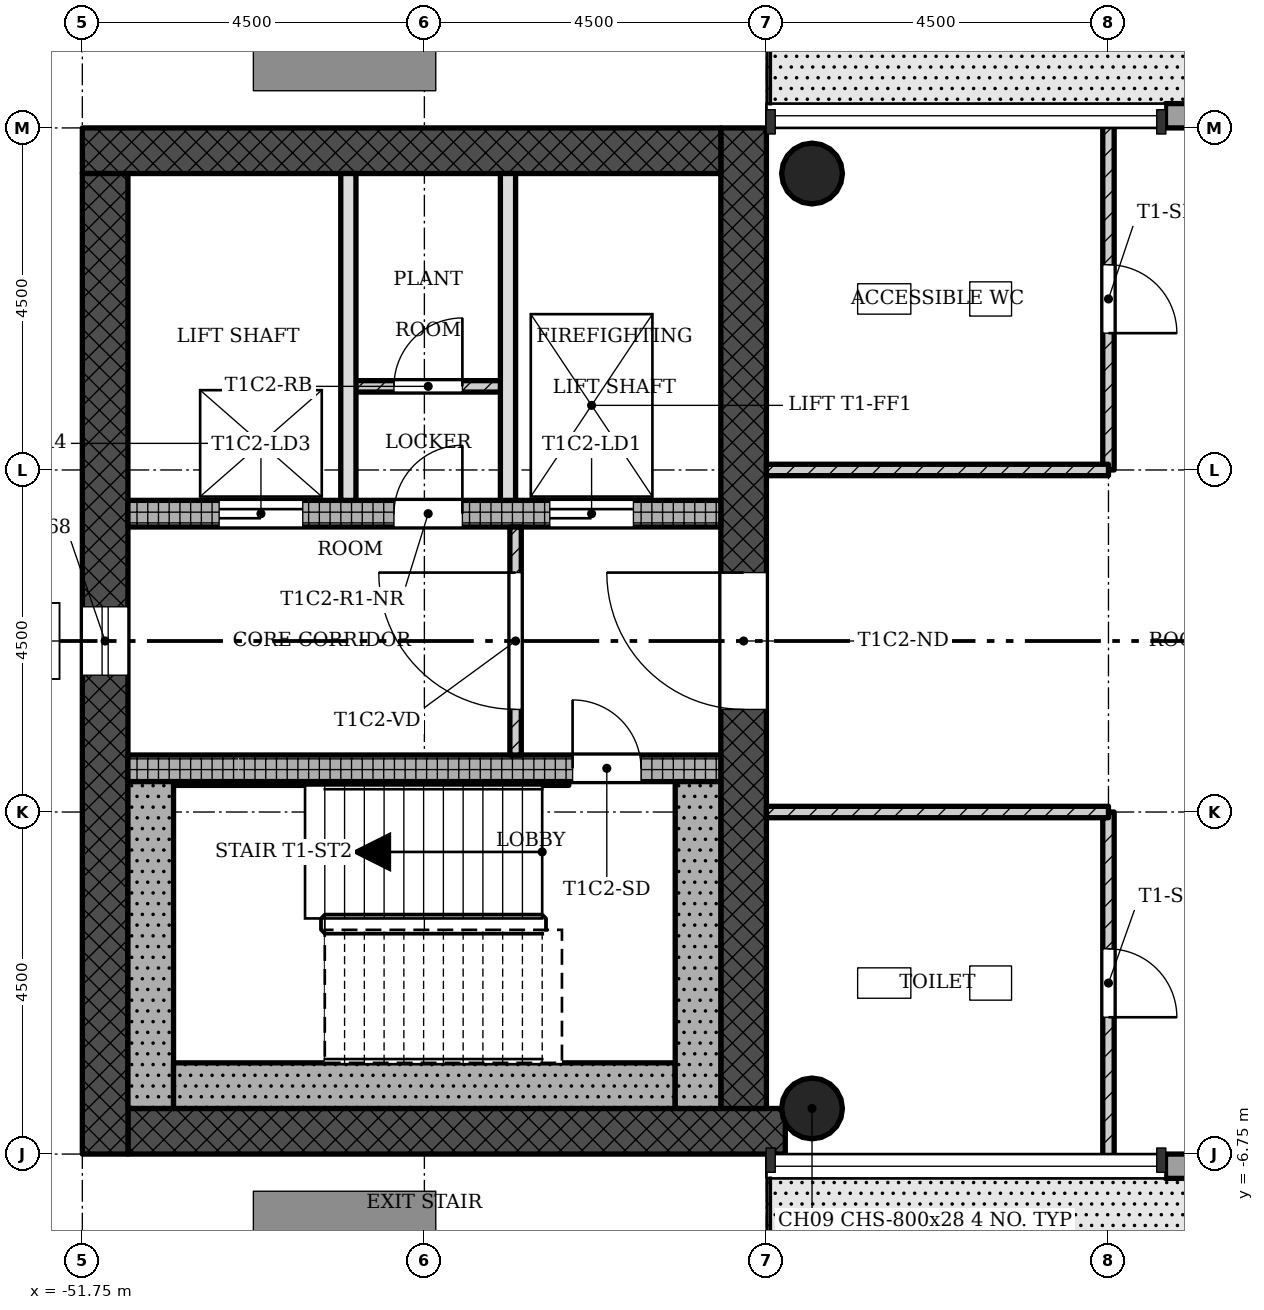
"""IFC4 building model, lengths in metres.
Left out: names, types, materials, properties, quantities, classifications, styles, units other than length and angle.
Written with IfcOpenShell. Run it as: python <this file> out.ifc"""

import sys

from ifc_helpers import new_model, si_unit, direction, frame, frame_2d, origin, origin_2d, place, context, subcontext, project, spatial, rectangle, hollow_circle, extrude, element, fill, save


model = new_model("IFC4")
c1 = context("Model", 3, precision=1e-05, world=origin(), true_north=direction((0.0, 1.0)))
c2 = subcontext(c1, "Body", "Model", "MODEL_VIEW")
j1 = project(units=[si_unit("LENGTHUNIT", "METRE"), si_unit("PLANEANGLEUNIT", "RADIAN")], contexts=[c1])
p1 = place(None, origin())
s1 = spatial("IfcSite", under=j1, at=p1, CompositionType="ELEMENT")
p2 = place(p1, origin())
s2 = spatial("IfcBuilding", under=s1, at=p2, CompositionType="ELEMENT")
p3 = place(p2, frame((0.0, 0.0, 246.9)))
s3 = spatial("IfcBuildingStorey", under=s2, at=p3, CompositionType="ELEMENT", Elevation=246.9)
p4 = place(p3, frame((-51.15, -6.45, 0.0), z_axis=(0.0, 0.0, 1.0), x_axis=(1.0, 0.0, 0.0)))
e1 = element("IfcWall", 1, at=p4, inside=s3, PredefinedType="SHEAR", context=c2, shape_type="SweptSolid", body=[
    extrude(rectangle(XDim=8.648, YDim=0.6, at=frame_2d((4.324, 0.0))), origin(), (0.0, 0.0, 1.0), 4.5),
])
p5 = place(p3, frame((-43.05, -6.15, 0.0), z_axis=(0.0, 0.0, 1.0), x_axis=(0.0, 1.0, 0.0)))
e2 = element("IfcWall", 2, at=p5, inside=s3, PredefinedType="SHEAR", context=c2, shape_type="SweptSolid", body=[
    extrude(rectangle(XDim=12.9, YDim=0.6, at=frame_2d((6.45, 0.0))), origin(), (0.0, 0.0, 1.0), 4.5),
])
p6 = place(p5, frame((5.25, 0.0, 0.0)))
e3 = element("IfcOpeningElement", 3, at=p6, cuts=e2, PredefinedType="OPENING", context=c2, shape_type="SweptSolid", body=[
    extrude(rectangle(XDim=1.8, YDim=2.1, at=frame_2d((0.9, 1.05))), frame((0.0, 0.31, 0.0), z_axis=(0.0, -1.0, 0.0), x_axis=(1.0, 0.0, 0.0)), (0.0, 0.0, 1.0), 0.62),
])
p7 = place(p3, frame((-43.35, 6.45, 0.0), z_axis=(0.0, 0.0, 1.0), x_axis=(-1.0, 0.0, 0.0)))
e4 = element("IfcWall", 4, at=p7, inside=s3, PredefinedType="SHEAR", context=c2, shape_type="SweptSolid", body=[
    extrude(rectangle(XDim=8.4, YDim=0.6, at=frame_2d((4.2, 0.0))), origin(), (0.0, 0.0, 1.0), 4.5),
])
p8 = place(p3, frame((-51.45, 6.15, 0.0), z_axis=(0.0, 0.0, 1.0), x_axis=(0.0, -1.0, 0.0)))
e5 = element("IfcWall", 5, at=p8, inside=s3, PredefinedType="SHEAR", context=c2, shape_type="SweptSolid", body=[
    extrude(rectangle(XDim=12.9, YDim=0.6, at=frame_2d((6.45, 0.0))), origin(), (0.0, 0.0, 1.0), 4.5),
])
p9 = place(p8, frame((5.7, 0.0, 0.45)))
e6 = element("IfcOpeningElement", 6, at=p9, cuts=e5, PredefinedType="OPENING", context=c2, shape_type="SweptSolid", body=[
    extrude(rectangle(XDim=0.9, YDim=2.4, at=frame_2d((0.45, 1.2))), frame((0.0, 0.31, 0.0), z_axis=(0.0, -1.0, 0.0), x_axis=(1.0, 0.0, 0.0)), (0.0, 0.0, 1.0), 0.62),
])
p10 = place(p3, frame((-51.15, -1.675, 0.0), z_axis=(0.0, 0.0, 1.0), x_axis=(1.0, 0.0, 0.0)))
e7 = element("IfcWall", 7, at=p10, inside=s3, PredefinedType="SHEAR", context=c2, shape_type="SweptSolid", body=[
    extrude(rectangle(XDim=7.8, YDim=0.35, at=frame_2d((3.9, 0.0))), origin(), (0.0, 0.0, 1.0), 4.5),
])
p11 = place(p10, frame((5.85, 0.0, 0.0)))
e8 = element("IfcOpeningElement", 8, at=p11, cuts=e7, PredefinedType="OPENING", context=c2, shape_type="SweptSolid", body=[
    extrude(rectangle(XDim=0.9, YDim=2.1, at=frame_2d((0.45, 1.05))), frame((0.0, 0.185, 0.0), z_axis=(0.0, -1.0, 0.0), x_axis=(1.0, 0.0, 0.0)), (0.0, 0.0, 1.0), 0.37),
])
p12 = place(p3, frame((-51.15, 1.675, 0.0), z_axis=(0.0, 0.0, 1.0), x_axis=(1.0, 0.0, 0.0)))
e9 = element("IfcWall", 9, at=p12, inside=s3, PredefinedType="SHEAR", context=c2, shape_type="SweptSolid", body=[
    extrude(rectangle(XDim=7.8, YDim=0.35, at=frame_2d((3.9, 0.0))), origin(), (0.0, 0.0, 1.0), 4.5),
])
p13 = place(p12, frame((5.55, 0.0, 0.0)))
e10 = element("IfcOpeningElement", 10, at=p13, cuts=e9, PredefinedType="OPENING", context=c2, shape_type="SweptSolid", body=[
    extrude(rectangle(XDim=1.1, YDim=2.1, at=frame_2d((0.55, 1.05))), frame((0.0, 0.185, 0.0), z_axis=(0.0, -1.0, 0.0), x_axis=(1.0, 0.0, 0.0)), (0.0, 0.0, 1.0), 0.37),
])
p14 = place(p12, frame((1.2, 0.0, 0.0)))
e11 = element("IfcOpeningElement", 11, at=p14, cuts=e9, PredefinedType="OPENING", context=c2, shape_type="SweptSolid", body=[
    extrude(rectangle(XDim=1.1, YDim=2.1, at=frame_2d((0.55, 1.05))), frame((0.0, 0.185, 0.0), z_axis=(0.0, -1.0, 0.0), x_axis=(1.0, 0.0, 0.0)), (0.0, 0.0, 1.0), 0.37),
])
p15 = place(p12, frame((3.5, 0.0, 0.0)))
e12 = element("IfcOpeningElement", 12, at=p15, cuts=e9, PredefinedType="OPENING", context=c2, shape_type="SweptSolid", body=[
    extrude(rectangle(XDim=0.9, YDim=2.1, at=frame_2d((0.45, 1.05))), frame((0.0, 0.185, 0.0), z_axis=(0.0, -1.0, 0.0), x_axis=(1.0, 0.0, 0.0)), (0.0, 0.0, 1.0), 0.37),
])
for number, where, z_axis, x_axis in (
    (13, (-42.15, -6.15, 0.0), (0.0, 0.0, 1.0), (1.0, 0.0, 0.0)),
    (14, (-42.15, 6.15, 0.0), (0.0, 0.0, 1.0), (1.0, 0.0, 0.0)),
):
    element("IfcColumn", number, at=place(p3, frame(where, z_axis=z_axis, x_axis=x_axis)), inside=s3, PredefinedType="COLUMN", context=c2, shape_type="SweptSolid", body=[
        extrude(hollow_circle(Radius=0.4, WallThickness=0.028, at=origin_2d()), origin(), (0.0, 0.0, 1.0), 4.5),
    ])
p16 = place(p3, frame((-37.5, -6.91, -0.02), z_axis=(0.0, 0.0, 1.0), x_axis=(1.0, 0.0, 0.0)))
e15 = element("IfcWall", 15, at=p16, inside=s3, PredefinedType="STANDARD", context=c2, shape_type="SweptSolid", body=[
    extrude(rectangle(XDim=3.0, YDim=0.32, at=frame_2d((1.5, 0.0))), origin(), (0.0, 0.0, 1.0), 4.22),
])
p17 = place(p16, frame((1.0, 0.0, 0.02)))
e16 = element("IfcOpeningElement", 16, at=p17, cuts=e15, PredefinedType="OPENING", context=c2, shape_type="SweptSolid", body=[
    extrude(rectangle(XDim=1.0, YDim=2.1, at=frame_2d((0.5, 1.05))), frame((0.0, 0.17, 0.0), z_axis=(0.0, -1.0, 0.0), x_axis=(1.0, 0.0, 0.0)), (0.0, 0.0, 1.0), 0.34),
])
p18 = place(p3, frame((-34.5, 6.91, -0.02), z_axis=(0.0, 0.0, 1.0), x_axis=(-1.0, 0.0, 0.0)))
e17 = element("IfcWall", 17, at=p18, inside=s3, PredefinedType="STANDARD", context=c2, shape_type="SweptSolid", body=[
    extrude(rectangle(XDim=3.0, YDim=0.32, at=frame_2d((1.5, 0.0))), origin(), (0.0, 0.0, 1.0), 4.22),
])
p19 = place(p18, frame((1.0, 0.0, 0.02)))
e18 = element("IfcOpeningElement", 18, at=p19, cuts=e17, PredefinedType="OPENING", context=c2, shape_type="SweptSolid", body=[
    extrude(rectangle(XDim=1.0, YDim=2.1, at=frame_2d((0.5, 1.05))), frame((0.0, 0.17, 0.0), z_axis=(0.0, -1.0, 0.0), x_axis=(1.0, 0.0, 0.0)), (0.0, 0.0, 1.0), 0.34),
])
p20 = place(p3, frame((-46.05, 1.5, 0.0), z_axis=(0.0, 0.0, 1.0), x_axis=(0.0, -1.0, 0.0)))
e19 = element("IfcWall", 19, at=p20, inside=s3, PredefinedType="PARTITIONING", context=c2, shape_type="SweptSolid", body=[
    extrude(rectangle(XDim=3.0, YDim=0.15, at=frame_2d((1.5, 0.0))), origin(), (0.0, 0.0, 1.0), 4.1),
])
p21 = place(p20, frame((0.6, 0.0, 0.0)))
e20 = element("IfcOpeningElement", 20, at=p21, cuts=e19, PredefinedType="OPENING", context=c2, shape_type="SweptSolid", body=[
    extrude(rectangle(XDim=1.8, YDim=2.1, at=frame_2d((0.9, 1.05))), frame((0.0, 0.085, 0.0), z_axis=(0.0, -1.0, 0.0), x_axis=(1.0, 0.0, 0.0)), (0.0, 0.0, 1.0), 0.17),
])
for number, where, z_axis, x_axis in (
    (21, (-48.25, 6.15, 0.0), (0.0, 0.0, 1.0), (0.0, -1.0, 0.0)),
    (22, (-46.15, 6.15, 0.0), (0.0, 0.0, 1.0), (0.0, -1.0, 0.0)),
):
    element("IfcWall", number, at=place(p3, frame(where, z_axis=z_axis, x_axis=x_axis)), inside=s3, PredefinedType="SOLIDWALL", context=c2, shape_type="SweptSolid", body=[
        extrude(rectangle(XDim=4.3, YDim=0.2, at=frame_2d((2.15, 0.0))), origin(), (0.0, 0.0, 1.0), 4.1),
    ])
p22 = place(p3, frame((-46.15, 3.35, 0.0), z_axis=(0.0, 0.0, 1.0), x_axis=(-1.0, 0.0, 0.0)))
e23 = element("IfcWall", 23, at=p22, inside=s3, PredefinedType="PARTITIONING", context=c2, shape_type="SweptSolid", body=[
    extrude(rectangle(XDim=2.1, YDim=0.15, at=frame_2d((1.05, 0.0))), origin(), (0.0, 0.0, 1.0), 4.1),
])
p23 = place(p22, frame((0.6, 0.0, 0.0)))
e24 = element("IfcOpeningElement", 24, at=p23, cuts=e23, PredefinedType="OPENING", context=c2, shape_type="SweptSolid", body=[
    extrude(rectangle(XDim=0.9, YDim=2.1, at=frame_2d((0.45, 1.05))), frame((0.0, 0.085, 0.0), z_axis=(0.0, -1.0, 0.0), x_axis=(1.0, 0.0, 0.0)), (0.0, 0.0, 1.0), 0.17),
])
p24 = place(p3, frame((-38.25, 2.25, 0.0), z_axis=(0.0, 0.0, 1.0), x_axis=(0.0, 1.0, 0.0)))
e25 = element("IfcWall", 25, at=p24, inside=s3, PredefinedType="PARTITIONING", context=c2, shape_type="SweptSolid", body=[
    extrude(rectangle(XDim=4.6, YDim=0.15, at=frame_2d((2.3, 0.0))), origin(), (0.0, 0.0, 1.0), 4.1),
])
p25 = place(p24, frame((1.8, 0.0, 0.0)))
e26 = element("IfcOpeningElement", 26, at=p25, cuts=e25, PredefinedType="OPENING", context=c2, shape_type="SweptSolid", body=[
    extrude(rectangle(XDim=0.9, YDim=2.1, at=frame_2d((0.45, 1.05))), frame((0.0, 0.085, 0.0), z_axis=(0.0, -1.0, 0.0), x_axis=(1.0, 0.0, 0.0)), (0.0, 0.0, 1.0), 0.17),
])
p26 = place(p3, frame((-42.75, 2.25, 0.0), z_axis=(0.0, 0.0, 1.0), x_axis=(1.0, 0.0, 0.0)))
e27 = element("IfcWall", 27, at=p26, inside=s3, PredefinedType="PARTITIONING", context=c2, shape_type="SweptSolid", body=[
    extrude(rectangle(XDim=4.5, YDim=0.15, at=frame_2d((2.25, 0.0))), origin(), (0.0, 0.0, 1.0), 4.1),
])
p27 = place(p3, frame((-38.25, -6.85, 0.0), z_axis=(0.0, 0.0, 1.0), x_axis=(0.0, 1.0, 0.0)))
e28 = element("IfcWall", 28, at=p27, inside=s3, PredefinedType="PARTITIONING", context=c2, shape_type="SweptSolid", body=[
    extrude(rectangle(XDim=4.6, YDim=0.15, at=frame_2d((2.3, 0.0))), origin(), (0.0, 0.0, 1.0), 4.1),
])
p28 = place(p27, frame((1.9, 0.0, 0.0)))
e29 = element("IfcOpeningElement", 29, at=p28, cuts=e28, PredefinedType="OPENING", context=c2, shape_type="SweptSolid", body=[
    extrude(rectangle(XDim=0.9, YDim=2.1, at=frame_2d((0.45, 1.05))), frame((0.0, 0.085, 0.0), z_axis=(0.0, -1.0, 0.0), x_axis=(1.0, 0.0, 0.0)), (0.0, 0.0, 1.0), 0.17),
])
p29 = place(p3, frame((-42.75, -2.25, 0.0), z_axis=(0.0, 0.0, 1.0), x_axis=(1.0, 0.0, 0.0)))
e30 = element("IfcWall", 30, at=p29, inside=s3, PredefinedType="PARTITIONING", context=c2, shape_type="SweptSolid", body=[
    extrude(rectangle(XDim=4.5, YDim=0.15, at=frame_2d((2.25, 0.0))), origin(), (0.0, 0.0, 1.0), 4.1),
])
p30 = place(p3, frame((-50.85, -1.85, 0.0), z_axis=(0.0, 0.0, 1.0), x_axis=(0.0, -1.0, 0.0)))
e31 = element("IfcWall", 31, at=p30, inside=s3, PredefinedType="SHEAR", context=c2, shape_type="SweptSolid", body=[
    extrude(rectangle(XDim=4.3, YDim=0.6, at=frame_2d((2.15, 0.0))), origin(), (0.0, 0.0, 1.0), 4.5),
])
p31 = place(p3, frame((-43.95, -5.85, 0.0), z_axis=(0.0, 0.0, 1.0), x_axis=(-1.0, 0.0, 0.0)))
e32 = element("IfcWall", 32, at=p31, inside=s3, PredefinedType="SHEAR", context=c2, shape_type="SweptSolid", body=[
    extrude(rectangle(XDim=6.6, YDim=0.6, at=frame_2d((3.3, 0.0))), origin(), (0.0, 0.0, 1.0), 4.5),
])
p32 = place(p3, frame((-43.65, -1.85, 0.0), z_axis=(0.0, 0.0, 1.0), x_axis=(0.0, -1.0, 0.0)))
e33 = element("IfcWall", 33, at=p32, inside=s3, PredefinedType="SHEAR", context=c2, shape_type="SweptSolid", body=[
    extrude(rectangle(XDim=4.3, YDim=0.6, at=frame_2d((2.15, 0.0))), origin(), (0.0, 0.0, 1.0), 4.5),
])
p33 = place(p3, frame((-45.35, -1.875, 0.0), z_axis=(0.0, 0.0, 1.0), x_axis=(-1.0, 0.0, 0.0)))
e34 = element("IfcWall", 34, at=p33, inside=s3, PredefinedType="SHEAR", context=c2, shape_type="SweptSolid", body=[
    extrude(rectangle(XDim=5.2, YDim=0.05, at=frame_2d((2.6, 0.0))), origin(), (0.0, 0.0, 1.0), 4.5),
])
p34 = place(p9, origin())
e35 = element("IfcWindow", 35, at=p34, inside=s3, PartitioningType="SINGLE_PANEL", PredefinedType="WINDOW", context=c2, shape_type="SweptSolid", body=[
    extrude(rectangle(XDim=0.9, YDim=2.4, at=frame_2d((0.45, 1.2))), frame((0.0, 0.03, 0.0), z_axis=(0.0, -1.0, 0.0), x_axis=(1.0, 0.0, 0.0)), (0.0, 0.0, 1.0), 0.06),
])
fill(e6, e35)
p35 = place(p21, origin())
e36 = element("IfcDoor", 36, at=p35, inside=s3, OperationType="SINGLE_SWING_LEFT", PredefinedType="DOOR", context=c2, shape_type="SweptSolid", body=[
    extrude(rectangle(XDim=1.8, YDim=2.1, at=frame_2d((0.9, 1.05))), frame((0.0, 0.025, 0.0), z_axis=(0.0, -1.0, 0.0), x_axis=(1.0, 0.0, 0.0)), (0.0, 0.0, 1.0), 0.05),
])
fill(e20, e36)
p36 = place(p23, origin())
e37 = element("IfcDoor", 37, at=p36, inside=s3, OperationType="SINGLE_SWING_LEFT", PredefinedType="DOOR", context=c2, shape_type="SweptSolid", body=[
    extrude(rectangle(XDim=0.9, YDim=2.1, at=frame_2d((0.45, 1.05))), frame((0.0, 0.025, 0.0), z_axis=(0.0, -1.0, 0.0), x_axis=(1.0, 0.0, 0.0)), (0.0, 0.0, 1.0), 0.05),
])
fill(e24, e37)
p37 = place(p25, origin())
e38 = element("IfcDoor", 38, at=p37, inside=s3, OperationType="SINGLE_SWING_LEFT", PredefinedType="DOOR", context=c2, shape_type="SweptSolid", body=[
    extrude(rectangle(XDim=0.9, YDim=2.1, at=frame_2d((0.45, 1.05))), frame((0.0, 0.025, 0.0), z_axis=(0.0, -1.0, 0.0), x_axis=(1.0, 0.0, 0.0)), (0.0, 0.0, 1.0), 0.05),
])
fill(e26, e38)
p38 = place(p28, origin())
e39 = element("IfcDoor", 39, at=p38, inside=s3, OperationType="SINGLE_SWING_LEFT", PredefinedType="DOOR", context=c2, shape_type="SweptSolid", body=[
    extrude(rectangle(XDim=0.9, YDim=2.1, at=frame_2d((0.45, 1.05))), frame((0.0, 0.025, 0.0), z_axis=(0.0, -1.0, 0.0), x_axis=(1.0, 0.0, 0.0)), (0.0, 0.0, 1.0), 0.05),
])
fill(e29, e39)
p39 = place(p11, origin())
e40 = element("IfcDoor", 40, at=p39, inside=s3, OperationType="SINGLE_SWING_RIGHT", PredefinedType="DOOR", context=c2, shape_type="SweptSolid", body=[
    extrude(rectangle(XDim=0.9, YDim=2.1, at=frame_2d((0.45, 1.05))), frame((0.0, 0.025, 0.0), z_axis=(0.0, -1.0, 0.0), x_axis=(1.0, 0.0, 0.0)), (0.0, 0.0, 1.0), 0.05),
])
fill(e8, e40)
p40 = place(p13, origin())
e41 = element("IfcDoor", 41, at=p40, inside=s3, OperationType="SLIDING_TO_LEFT", PredefinedType="DOOR", context=c2, shape_type="SweptSolid", body=[
    extrude(rectangle(XDim=1.1, YDim=2.1, at=frame_2d((0.55, 1.05))), frame((0.0, 0.025, 0.0), z_axis=(0.0, -1.0, 0.0), x_axis=(1.0, 0.0, 0.0)), (0.0, 0.0, 1.0), 0.05),
])
fill(e10, e41)
p41 = place(p14, origin())
e42 = element("IfcDoor", 42, at=p41, inside=s3, OperationType="SLIDING_TO_LEFT", PredefinedType="DOOR", context=c2, shape_type="SweptSolid", body=[
    extrude(rectangle(XDim=1.1, YDim=2.1, at=frame_2d((0.55, 1.05))), frame((0.0, 0.025, 0.0), z_axis=(0.0, -1.0, 0.0), x_axis=(1.0, 0.0, 0.0)), (0.0, 0.0, 1.0), 0.05),
])
fill(e11, e42)
p42 = place(p15, origin())
e43 = element("IfcDoor", 43, at=p42, inside=s3, OperationType="SINGLE_SWING_LEFT", PredefinedType="DOOR", context=c2, shape_type="SweptSolid", body=[
    extrude(rectangle(XDim=0.9, YDim=2.1, at=frame_2d((0.45, 1.05))), frame((0.0, 0.025, 0.0), z_axis=(0.0, -1.0, 0.0), x_axis=(1.0, 0.0, 0.0)), (0.0, 0.0, 1.0), 0.05),
])
fill(e12, e43)
p43 = place(p6, origin())
e44 = element("IfcDoor", 44, at=p43, inside=s3, OperationType="SINGLE_SWING_LEFT", PredefinedType="DOOR", context=c2, shape_type="SweptSolid", body=[
    extrude(rectangle(XDim=1.8, YDim=2.1, at=frame_2d((0.9, 1.05))), frame((0.0, 0.025, 0.0), z_axis=(0.0, -1.0, 0.0), x_axis=(1.0, 0.0, 0.0)), (0.0, 0.0, 1.0), 0.05),
])
fill(e3, e44)
save(model, sys.argv[1])
